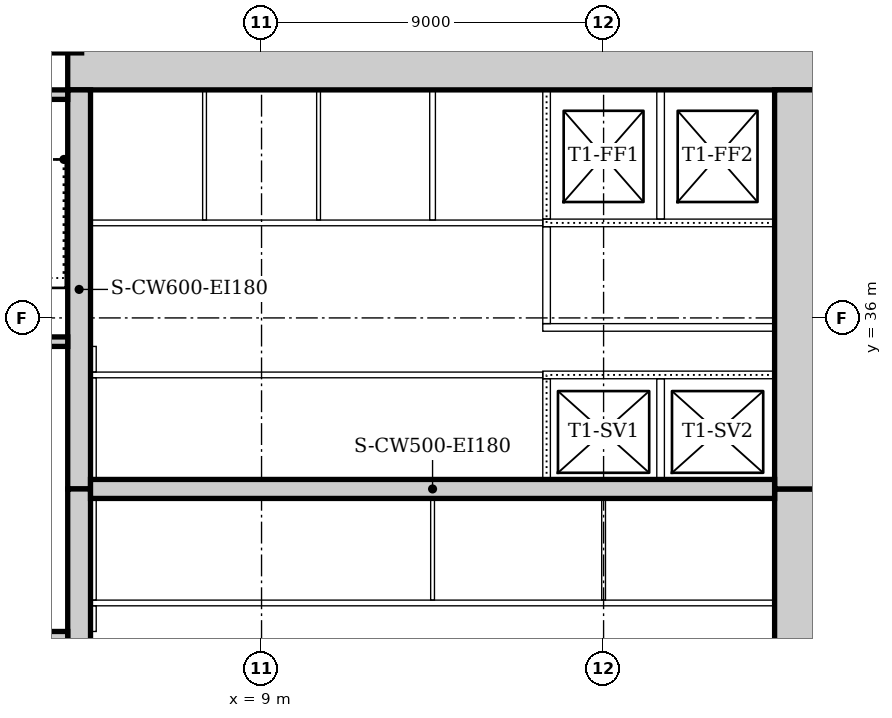
"""IFC4 building model, lengths in metres.
Left out: names, types, materials, properties, quantities, classifications, styles, units other than length and angle.
Written with IfcOpenShell. Run it as: python <this file> out.ifc"""

import sys

from ifc_helpers import new_model, si_unit, direction, frame, frame_2d, origin, origin_2d, place, context, subcontext, project, spatial, rectangle, extrude, element, fill, save


model = new_model("IFC4")
c1 = context("Model", 3, precision=1e-05, world=origin(), true_north=direction((0.0, 1.0)))
c2 = subcontext(c1, "Body", "Model", "MODEL_VIEW")
j1 = project(units=[si_unit("LENGTHUNIT", "METRE"), si_unit("PLANEANGLEUNIT", "RADIAN")], contexts=[c1])
p1 = place(None, origin())
s1 = spatial("IfcSite", under=j1, at=p1, CompositionType="ELEMENT")
p2 = place(p1, origin())
s2 = spatial("IfcBuilding", under=s1, at=p2, CompositionType="ELEMENT")
p3 = place(p2, frame((0.0, 0.0, -9.5)))
s3 = spatial("IfcBuildingStorey", under=s2, at=p3, CompositionType="ELEMENT", Elevation=-9.5)
p4 = place(p3, frame((23.7, 42.6, 0.0), z_axis=(0.0, 0.0, 1.0), x_axis=(-1.0, 0.0, 0.0)))
e1 = element("IfcWall", 1, at=p4, inside=s3, PredefinedType="SOLIDWALL", context=c2, shape_type="SweptSolid", body=[
    extrude(rectangle(XDim=19.8, YDim=1.2, at=frame_2d((9.9, 0.0))), origin(), (0.0, 0.0, 1.0), 4.5),
])
p5 = place(p3, frame((23.1, 21.0, 0.0), z_axis=(0.0, 0.0, 1.0), x_axis=(0.0, 1.0, 0.0)))
e2 = element("IfcWall", 2, at=p5, inside=s3, PredefinedType="SOLIDWALL", context=c2, shape_type="SweptSolid", body=[
    extrude(rectangle(XDim=10.5, YDim=1.2, at=frame_2d((5.25, 0.0))), origin(), (0.0, 0.0, 1.0), 4.5),
])
p6 = place(p5, frame((4.35, 0.0, 0.0)))
e3 = element("IfcOpeningElement", 3, at=p6, cuts=e2, PredefinedType="OPENING", context=c2, shape_type="SweptSolid", body=[
    extrude(rectangle(XDim=1.8, YDim=2.1, at=frame_2d((0.9, 1.05))), frame((0.0, 0.61, 0.0), z_axis=(0.0, -1.0, 0.0), x_axis=(1.0, 0.0, 0.0)), (0.0, 0.0, 1.0), 1.22),
])
p7 = place(p3, frame((23.1, 31.5, 0.0), z_axis=(0.0, 0.0, 1.0), x_axis=(0.0, 1.0, 0.0)))
e4 = element("IfcWall", 4, at=p7, inside=s3, PredefinedType="SOLIDWALL", context=c2, shape_type="SweptSolid", body=[
    extrude(rectangle(XDim=10.5, YDim=1.2, at=frame_2d((5.25, 0.0))), origin(), (0.0, 0.0, 1.0), 4.5),
])
p8 = place(p7, frame((3.15, 0.0, 0.0)))
e5 = element("IfcOpeningElement", 5, at=p8, cuts=e4, PredefinedType="OPENING", context=c2, shape_type="SweptSolid", body=[
    extrude(rectangle(XDim=1.0, YDim=2.1, at=frame_2d((0.5, 1.05))), frame((0.0, 0.61, 0.0), z_axis=(0.0, -1.0, 0.0), x_axis=(1.0, 0.0, 0.0)), (0.0, 0.0, 1.0), 1.22),
])
p9 = place(p7, frame((5.2, 0.0, 0.0)))
e6 = element("IfcOpeningElement", 6, at=p9, cuts=e4, PredefinedType="OPENING", context=c2, shape_type="SweptSolid", body=[
    extrude(rectangle(XDim=1.0, YDim=2.1, at=frame_2d((0.5, 1.05))), frame((0.0, 0.61, 0.0), z_axis=(0.0, -1.0, 0.0), x_axis=(1.0, 0.0, 0.0)), (0.0, 0.0, 1.0), 1.22),
])
p10 = place(p3, frame((4.2, 42.0, 0.0), z_axis=(0.0, 0.0, 1.0), x_axis=(0.0, -1.0, 0.0)))
e7 = element("IfcWall", 7, at=p10, inside=s3, PredefinedType="SOLIDWALL", context=c2, shape_type="SweptSolid", body=[
    extrude(rectangle(XDim=10.5, YDim=0.6, at=frame_2d((5.25, 0.0))), origin(), (0.0, 0.0, 1.0), 4.5),
])
p11 = place(p10, frame((5.3, 0.0, 0.0)))
e8 = element("IfcOpeningElement", 8, at=p11, cuts=e7, PredefinedType="OPENING", context=c2, shape_type="SweptSolid", body=[
    extrude(rectangle(XDim=1.0, YDim=2.1, at=frame_2d((0.5, 1.05))), frame((0.0, 0.31, 0.0), z_axis=(0.0, -1.0, 0.0), x_axis=(1.0, 0.0, 0.0)), (0.0, 0.0, 1.0), 0.62),
])
p12 = place(p3, frame((4.2, 31.5, 0.0), z_axis=(0.0, 0.0, 1.0), x_axis=(0.0, -1.0, 0.0)))
e9 = element("IfcWall", 9, at=p12, inside=s3, PredefinedType="SOLIDWALL", context=c2, shape_type="SweptSolid", body=[
    extrude(rectangle(XDim=10.5, YDim=0.6, at=frame_2d((5.25, 0.0))), origin(), (0.0, 0.0, 1.0), 4.5),
])
p13 = place(p12, frame((4.25, 0.0, 0.0)))
e10 = element("IfcOpeningElement", 10, at=p13, cuts=e9, PredefinedType="OPENING", context=c2, shape_type="SweptSolid", body=[
    extrude(rectangle(XDim=1.0, YDim=2.1, at=frame_2d((0.5, 1.05))), frame((0.0, 0.31, 0.0), z_axis=(0.0, -1.0, 0.0), x_axis=(1.0, 0.0, 0.0)), (0.0, 0.0, 1.0), 0.62),
])
p14 = place(p3, frame((4.5, 31.5, 0.0), z_axis=(0.0, 0.0, 1.0), x_axis=(1.0, 0.0, 0.0)))
e11 = element("IfcWall", 11, at=p14, inside=s3, PredefinedType="SOLIDWALL", context=c2, shape_type="SweptSolid", body=[
    extrude(rectangle(XDim=18.0, YDim=0.5, at=frame_2d((9.0, 0.0))), origin(), (0.0, 0.0, 1.0), 4.5),
])
p15 = place(p3, frame((3.9, 27.625, 0.0), z_axis=(0.0, 0.0, 1.0), x_axis=(-1.0, 0.0, 0.0)))
e12 = element("IfcWall", 12, at=p15, inside=s3, PredefinedType="SOLIDWALL", context=c2, shape_type="SweptSolid", body=[
    extrude(rectangle(XDim=3.54, YDim=0.25, at=frame_2d((1.77, 0.0))), origin(), (0.0, 0.0, 1.0), 4.5),
])
p16 = place(p15, frame((0.4, 0.0, 0.0)))
e13 = element("IfcOpeningElement", 13, at=p16, cuts=e12, PredefinedType="OPENING", context=c2, shape_type="SweptSolid", body=[
    extrude(rectangle(XDim=1.0, YDim=2.1, at=frame_2d((0.5, 1.05))), frame((0.0, 0.135, 0.0), z_axis=(0.0, -1.0, 0.0), x_axis=(1.0, 0.0, 0.0)), (0.0, 0.0, 1.0), 0.27),
])
p17 = place(p3, frame((0.36, 35.375, 0.0), z_axis=(0.0, 0.0, 1.0), x_axis=(1.0, 0.0, 0.0)))
e14 = element("IfcWall", 14, at=p17, inside=s3, PredefinedType="SOLIDWALL", context=c2, shape_type="SweptSolid", body=[
    extrude(rectangle(XDim=3.54, YDim=0.25, at=frame_2d((1.77, 0.0))), origin(), (0.0, 0.0, 1.0), 4.5),
])
p18 = place(p17, frame((2.14, 0.0, 0.0)))
e15 = element("IfcOpeningElement", 15, at=p18, cuts=e14, PredefinedType="OPENING", context=c2, shape_type="SweptSolid", body=[
    extrude(rectangle(XDim=1.0, YDim=2.1, at=frame_2d((0.5, 1.05))), frame((0.0, 0.135, 0.0), z_axis=(0.0, -1.0, 0.0), x_axis=(1.0, 0.0, 0.0)), (0.0, 0.0, 1.0), 0.27),
])
p19 = place(p3, frame((3.9, 41.875, 0.0), z_axis=(0.0, 0.0, 1.0), x_axis=(-1.0, 0.0, 0.0)))
e16 = element("IfcWall", 16, at=p19, inside=s3, PredefinedType="SOLIDWALL", context=c2, shape_type="SweptSolid", body=[
    extrude(rectangle(XDim=3.54, YDim=0.25, at=frame_2d((1.77, 0.0))), origin(), (0.0, 0.0, 1.0), 4.5),
])
p20 = place(p3, frame((3.667, 43.574, 0.0), z_axis=(0.0, 0.0, 1.0), x_axis=(1.0, 0.0, 0.0)))
e17 = element("IfcColumn", 17, at=p20, inside=s3, PredefinedType="COLUMN", context=c2, shape_type="SweptSolid", body=[
    extrude(rectangle(XDim=1.2, YDim=1.2, at=origin_2d()), origin(), (0.0, 0.0, 1.0), 4.15),
])
p21 = place(p3, frame((16.4, 35.75, 0.0), z_axis=(0.0, 0.0, 1.0), x_axis=(1.0, 0.0, 0.0)))
e18 = element("IfcWall", 18, at=p21, inside=s3, PredefinedType="PARTITIONING", context=c2, shape_type="SweptSolid", body=[
    extrude(rectangle(XDim=6.1, YDim=0.2, at=frame_2d((3.05, 0.0))), origin(), (0.0, 0.0, 1.0), 4.15),
])
p22 = place(p3, frame((16.4, 38.5, 0.0), z_axis=(0.0, 0.0, 1.0), x_axis=(1.0, 0.0, 0.0)))
e19 = element("IfcWall", 19, at=p22, inside=s3, PredefinedType="PARTITIONING", context=c2, shape_type="SweptSolid", body=[
    extrude(rectangle(XDim=6.1, YDim=0.2, at=frame_2d((3.05, 0.0))), origin(), (0.0, 0.0, 1.0), 4.15),
])
p23 = place(p22, frame((1.0, 0.0, 0.0)))
e20 = element("IfcOpeningElement", 20, at=p23, cuts=e19, PredefinedType="OPENING", context=c2, shape_type="SweptSolid", body=[
    extrude(rectangle(XDim=1.2, YDim=2.1, at=frame_2d((0.6, 1.05))), frame((0.0, 0.11, 0.0), z_axis=(0.0, -1.0, 0.0), x_axis=(1.0, 0.0, 0.0)), (0.0, 0.0, 1.0), 0.22),
])
p24 = place(p22, frame((4.0, 0.0, 0.0)))
e21 = element("IfcOpeningElement", 21, at=p24, cuts=e19, PredefinedType="OPENING", context=c2, shape_type="SweptSolid", body=[
    extrude(rectangle(XDim=1.2, YDim=2.1, at=frame_2d((0.6, 1.05))), frame((0.0, 0.11, 0.0), z_axis=(0.0, -1.0, 0.0), x_axis=(1.0, 0.0, 0.0)), (0.0, 0.0, 1.0), 0.22),
])
p25 = place(p3, frame((16.5, 35.85, 0.0), z_axis=(0.0, 0.0, 1.0), x_axis=(0.0, 1.0, 0.0)))
e22 = element("IfcWall", 22, at=p25, inside=s3, PredefinedType="PARTITIONING", context=c2, shape_type="SweptSolid", body=[
    extrude(rectangle(XDim=2.55, YDim=0.2, at=frame_2d((1.275, 0.0))), origin(), (0.0, 0.0, 1.0), 4.15),
])
p26 = place(p3, frame((16.4, 34.5, 0.0), z_axis=(0.0, 0.0, 1.0), x_axis=(1.0, 0.0, 0.0)))
e23 = element("IfcWall", 23, at=p26, inside=s3, PredefinedType="PARTITIONING", context=c2, shape_type="SweptSolid", body=[
    extrude(rectangle(XDim=6.1, YDim=0.2, at=frame_2d((3.05, 0.0))), origin(), (0.0, 0.0, 1.0), 4.15),
])
p27 = place(p26, frame((1.05, 0.0, 0.0)))
e24 = element("IfcOpeningElement", 24, at=p27, cuts=e23, PredefinedType="OPENING", context=c2, shape_type="SweptSolid", body=[
    extrude(rectangle(XDim=1.1, YDim=2.1, at=frame_2d((0.55, 1.05))), frame((0.0, 0.11, 0.0), z_axis=(0.0, -1.0, 0.0), x_axis=(1.0, 0.0, 0.0)), (0.0, 0.0, 1.0), 0.22),
])
p28 = place(p26, frame((4.05, 0.0, 0.0)))
e25 = element("IfcOpeningElement", 25, at=p28, cuts=e23, PredefinedType="OPENING", context=c2, shape_type="SweptSolid", body=[
    extrude(rectangle(XDim=1.1, YDim=2.1, at=frame_2d((0.55, 1.05))), frame((0.0, 0.11, 0.0), z_axis=(0.0, -1.0, 0.0), x_axis=(1.0, 0.0, 0.0)), (0.0, 0.0, 1.0), 0.22),
])
for number, where, z_axis, x_axis in (
    (26, (16.5, 38.6, 0.0), (0.0, 0.0, 1.0), (0.0, 1.0, 0.0)),
    (27, (19.5, 38.6, 0.0), (0.0, 0.0, 1.0), (0.0, 1.0, 0.0)),
):
    element("IfcWall", number, at=place(p3, frame(where, z_axis=z_axis, x_axis=x_axis)), inside=s3, PredefinedType="PARTITIONING", context=c2, shape_type="SweptSolid", body=[
        extrude(rectangle(XDim=3.4, YDim=0.2, at=frame_2d((1.7, 0.0))), origin(), (0.0, 0.0, 1.0), 4.15),
    ])
for number, where, z_axis, x_axis in (
    (28, (16.5, 31.75, 0.0), (0.0, 0.0, 1.0), (0.0, 1.0, 0.0)),
    (29, (19.5, 31.75, 0.0), (0.0, 0.0, 1.0), (0.0, 1.0, 0.0)),
):
    element("IfcWall", number, at=place(p3, frame(where, z_axis=z_axis, x_axis=x_axis)), inside=s3, PredefinedType="PARTITIONING", context=c2, shape_type="SweptSolid", body=[
        extrude(rectangle(XDim=2.65, YDim=0.2, at=frame_2d((1.325, 0.0))), origin(), (0.0, 0.0, 1.0), 4.15),
    ])
p29 = place(p3, frame((4.5, 28.5, 0.0), z_axis=(0.0, 0.0, 1.0), x_axis=(1.0, 0.0, 0.0)))
e30 = element("IfcWall", 30, at=p29, inside=s3, PredefinedType="PARTITIONING", context=c2, shape_type="SweptSolid", body=[
    extrude(rectangle(XDim=18.0, YDim=0.15, at=frame_2d((9.0, 0.0))), origin(), (0.0, 0.0, 1.0), 4.15),
])
p30 = place(p29, frame((4.1, 0.0, 0.0)))
e31 = element("IfcOpeningElement", 31, at=p30, cuts=e30, PredefinedType="OPENING", context=c2, shape_type="SweptSolid", body=[
    extrude(rectangle(XDim=0.9, YDim=2.1, at=frame_2d((0.45, 1.05))), frame((0.0, 0.085, 0.0), z_axis=(0.0, -1.0, 0.0), x_axis=(1.0, 0.0, 0.0)), (0.0, 0.0, 1.0), 0.17),
])
p31 = place(p29, frame((10.8, 0.0, 0.0)))
e32 = element("IfcOpeningElement", 32, at=p31, cuts=e30, PredefinedType="OPENING", context=c2, shape_type="SweptSolid", body=[
    extrude(rectangle(XDim=0.9, YDim=2.1, at=frame_2d((0.45, 1.05))), frame((0.0, 0.085, 0.0), z_axis=(0.0, -1.0, 0.0), x_axis=(1.0, 0.0, 0.0)), (0.0, 0.0, 1.0), 0.17),
])
p32 = place(p29, frame((15.2, 0.0, 0.0)))
e33 = element("IfcOpeningElement", 33, at=p32, cuts=e30, PredefinedType="OPENING", context=c2, shape_type="SweptSolid", body=[
    extrude(rectangle(XDim=0.9, YDim=2.1, at=frame_2d((0.45, 1.05))), frame((0.0, 0.085, 0.0), z_axis=(0.0, -1.0, 0.0), x_axis=(1.0, 0.0, 0.0)), (0.0, 0.0, 1.0), 0.17),
])
p33 = place(p3, frame((4.5, 34.5, 0.0), z_axis=(0.0, 0.0, 1.0), x_axis=(1.0, 0.0, 0.0)))
e34 = element("IfcWall", 34, at=p33, inside=s3, PredefinedType="PARTITIONING", context=c2, shape_type="SweptSolid", body=[
    extrude(rectangle(XDim=11.9, YDim=0.15, at=frame_2d((5.95, 0.0))), origin(), (0.0, 0.0, 1.0), 4.15),
])
p34 = place(p33, frame((5.5, 0.0, 0.0)))
e35 = element("IfcOpeningElement", 35, at=p34, cuts=e34, PredefinedType="OPENING", context=c2, shape_type="SweptSolid", body=[
    extrude(rectangle(XDim=0.9, YDim=2.1, at=frame_2d((0.45, 1.05))), frame((0.0, 0.085, 0.0), z_axis=(0.0, -1.0, 0.0), x_axis=(1.0, 0.0, 0.0)), (0.0, 0.0, 1.0), 0.17),
])
p35 = place(p3, frame((4.5, 38.5, 0.0), z_axis=(0.0, 0.0, 1.0), x_axis=(1.0, 0.0, 0.0)))
e36 = element("IfcWall", 36, at=p35, inside=s3, PredefinedType="PARTITIONING", context=c2, shape_type="SweptSolid", body=[
    extrude(rectangle(XDim=11.9, YDim=0.15, at=frame_2d((5.95, 0.0))), origin(), (0.0, 0.0, 1.0), 4.15),
])
p36 = place(p35, frame((1.1, 0.0, 0.0)))
e37 = element("IfcOpeningElement", 37, at=p36, cuts=e36, PredefinedType="OPENING", context=c2, shape_type="SweptSolid", body=[
    extrude(rectangle(XDim=0.9, YDim=2.1, at=frame_2d((0.45, 1.05))), frame((0.0, 0.085, 0.0), z_axis=(0.0, -1.0, 0.0), x_axis=(1.0, 0.0, 0.0)), (0.0, 0.0, 1.0), 0.17),
])
p37 = place(p35, frame((4.05, 0.0, 0.0)))
e38 = element("IfcOpeningElement", 38, at=p37, cuts=e36, PredefinedType="OPENING", context=c2, shape_type="SweptSolid", body=[
    extrude(rectangle(XDim=0.9, YDim=2.1, at=frame_2d((0.45, 1.05))), frame((0.0, 0.085, 0.0), z_axis=(0.0, -1.0, 0.0), x_axis=(1.0, 0.0, 0.0)), (0.0, 0.0, 1.0), 0.17),
])
p38 = place(p35, frame((7.05, 0.0, 0.0)))
e39 = element("IfcOpeningElement", 39, at=p38, cuts=e36, PredefinedType="OPENING", context=c2, shape_type="SweptSolid", body=[
    extrude(rectangle(XDim=0.9, YDim=2.1, at=frame_2d((0.45, 1.05))), frame((0.0, 0.085, 0.0), z_axis=(0.0, -1.0, 0.0), x_axis=(1.0, 0.0, 0.0)), (0.0, 0.0, 1.0), 0.17),
])
p39 = place(p35, frame((9.95, 0.0, 0.0)))
e40 = element("IfcOpeningElement", 40, at=p39, cuts=e36, PredefinedType="OPENING", context=c2, shape_type="SweptSolid", body=[
    extrude(rectangle(XDim=0.8, YDim=2.1, at=frame_2d((0.4, 1.05))), frame((0.0, 0.085, 0.0), z_axis=(0.0, -1.0, 0.0), x_axis=(1.0, 0.0, 0.0)), (0.0, 0.0, 1.0), 0.17),
])
p40 = place(p3, frame((4.575, 34.575, 0.0), z_axis=(0.0, 0.0, 1.0), x_axis=(0.0, 1.0, 0.0)))
e41 = element("IfcWall", 41, at=p40, inside=s3, PredefinedType="PARTITIONING", context=c2, shape_type="SweptSolid", body=[
    extrude(rectangle(XDim=0.675, YDim=0.15, at=frame_2d((0.338, 0.0))), origin(), (0.0, 0.0, 1.0), 4.15),
])
p41 = place(p3, frame((4.575, 31.75, 0.0), z_axis=(0.0, 0.0, 1.0), x_axis=(0.0, 1.0, 0.0)))
e42 = element("IfcWall", 42, at=p41, inside=s3, PredefinedType="PARTITIONING", context=c2, shape_type="SweptSolid", body=[
    extrude(rectangle(XDim=2.675, YDim=0.15, at=frame_2d((1.337, 0.0))), origin(), (0.0, 0.0, 1.0), 4.15),
])
p42 = place(p3, frame((4.575, 27.75, 0.0), z_axis=(0.0, 0.0, 1.0), x_axis=(0.0, 1.0, 0.0)))
e43 = element("IfcWall", 43, at=p42, inside=s3, PredefinedType="PARTITIONING", context=c2, shape_type="SweptSolid", body=[
    extrude(rectangle(XDim=0.675, YDim=0.15, at=frame_2d((0.338, 0.0))), origin(), (0.0, 0.0, 1.0), 4.15),
])
p43 = place(p3, frame((4.575, 28.575, 0.0), z_axis=(0.0, 0.0, 1.0), x_axis=(0.0, 1.0, 0.0)))
e44 = element("IfcWall", 44, at=p43, inside=s3, PredefinedType="PARTITIONING", context=c2, shape_type="SweptSolid", body=[
    extrude(rectangle(XDim=2.675, YDim=0.15, at=frame_2d((1.337, 0.0))), origin(), (0.0, 0.0, 1.0), 4.15),
])
p44 = place(p3, frame((13.5, 38.575, 0.0), z_axis=(0.0, 0.0, 1.0), x_axis=(0.0, 1.0, 0.0)))
e45 = element("IfcWall", 45, at=p44, inside=s3, PredefinedType="PARTITIONING", context=c2, shape_type="SweptSolid", body=[
    extrude(rectangle(XDim=3.425, YDim=0.15, at=frame_2d((1.712, 0.0))), origin(), (0.0, 0.0, 1.0), 4.15),
])
for number, where, z_axis, x_axis in (
    (46, (7.5, 38.575, 0.0), (0.0, 0.0, 1.0), (0.0, 1.0, 0.0)),
    (47, (10.5, 38.575, 0.0), (0.0, 0.0, 1.0), (0.0, 1.0, 0.0)),
):
    element("IfcWall", number, at=place(p3, frame(where, z_axis=z_axis, x_axis=x_axis)), inside=s3, PredefinedType="PARTITIONING", context=c2, shape_type="SweptSolid", body=[
        extrude(rectangle(XDim=3.425, YDim=0.1, at=frame_2d((1.712, 0.0))), origin(), (0.0, 0.0, 1.0), 4.15),
    ])
for number, where, z_axis, x_axis in (
    (48, (13.5, 28.575, 0.0), (0.0, 0.0, 1.0), (0.0, 1.0, 0.0)),
    (49, (18.0, 28.575, 0.0), (0.0, 0.0, 1.0), (0.0, 1.0, 0.0)),
):
    element("IfcWall", number, at=place(p3, frame(where, z_axis=z_axis, x_axis=x_axis)), inside=s3, PredefinedType="PARTITIONING", context=c2, shape_type="SweptSolid", body=[
        extrude(rectangle(XDim=2.675, YDim=0.1, at=frame_2d((1.337, 0.0))), origin(), (0.0, 0.0, 1.0), 4.15),
    ])
p45 = place(p11, frame((1.0, 0.0, 0.0), z_axis=(0.0, 0.0, 1.0), x_axis=(-1.0, 0.0, 0.0)))
e50 = element("IfcDoor", 50, at=p45, inside=s3, OperationType="SINGLE_SWING_LEFT", PredefinedType="DOOR", context=c2, shape_type="SweptSolid", body=[
    extrude(rectangle(XDim=1.0, YDim=2.1, at=frame_2d((0.5, 1.05))), frame((0.0, 0.025, 0.0), z_axis=(0.0, -1.0, 0.0), x_axis=(1.0, 0.0, 0.0)), (0.0, 0.0, 1.0), 0.05),
])
fill(e8, e50)
p46 = place(p27, origin())
e51 = element("IfcDoor", 51, at=p46, inside=s3, OperationType="SLIDING_TO_LEFT", PredefinedType="DOOR", context=c2, shape_type="SweptSolid", body=[
    extrude(rectangle(XDim=1.1, YDim=2.1, at=frame_2d((0.55, 1.05))), frame((0.0, 0.025, 0.0), z_axis=(0.0, -1.0, 0.0), x_axis=(1.0, 0.0, 0.0)), (0.0, 0.0, 1.0), 0.05),
])
fill(e24, e51)
p47 = place(p28, origin())
e52 = element("IfcDoor", 52, at=p47, inside=s3, OperationType="SLIDING_TO_LEFT", PredefinedType="DOOR", context=c2, shape_type="SweptSolid", body=[
    extrude(rectangle(XDim=1.1, YDim=2.1, at=frame_2d((0.55, 1.05))), frame((0.0, 0.025, 0.0), z_axis=(0.0, -1.0, 0.0), x_axis=(1.0, 0.0, 0.0)), (0.0, 0.0, 1.0), 0.05),
])
fill(e25, e52)
p48 = place(p23, origin())
e53 = element("IfcDoor", 53, at=p48, inside=s3, OperationType="SLIDING_TO_LEFT", PredefinedType="DOOR", context=c2, shape_type="SweptSolid", body=[
    extrude(rectangle(XDim=1.2, YDim=2.1, at=frame_2d((0.6, 1.05))), frame((0.0, 0.025, 0.0), z_axis=(0.0, -1.0, 0.0), x_axis=(1.0, 0.0, 0.0)), (0.0, 0.0, 1.0), 0.05),
])
fill(e20, e53)
p49 = place(p24, origin())
e54 = element("IfcDoor", 54, at=p49, inside=s3, OperationType="SLIDING_TO_LEFT", PredefinedType="DOOR", context=c2, shape_type="SweptSolid", body=[
    extrude(rectangle(XDim=1.2, YDim=2.1, at=frame_2d((0.6, 1.05))), frame((0.0, 0.025, 0.0), z_axis=(0.0, -1.0, 0.0), x_axis=(1.0, 0.0, 0.0)), (0.0, 0.0, 1.0), 0.05),
])
fill(e21, e54)
p50 = place(p8, frame((1.0, 0.0, 0.0), z_axis=(0.0, 0.0, 1.0), x_axis=(-1.0, 0.0, 0.0)))
e55 = element("IfcDoor", 55, at=p50, inside=s3, OperationType="SINGLE_SWING_LEFT", PredefinedType="DOOR", context=c2, shape_type="SweptSolid", body=[
    extrude(rectangle(XDim=1.0, YDim=2.1, at=frame_2d((0.5, 1.05))), frame((0.0, 0.025, 0.0), z_axis=(0.0, -1.0, 0.0), x_axis=(1.0, 0.0, 0.0)), (0.0, 0.0, 1.0), 0.05),
])
fill(e5, e55)
p51 = place(p9, frame((1.0, 0.0, 0.0), z_axis=(0.0, 0.0, 1.0), x_axis=(-1.0, 0.0, 0.0)))
e56 = element("IfcDoor", 56, at=p51, inside=s3, OperationType="SINGLE_SWING_RIGHT", PredefinedType="DOOR", context=c2, shape_type="SweptSolid", body=[
    extrude(rectangle(XDim=1.0, YDim=2.1, at=frame_2d((0.5, 1.05))), frame((0.0, 0.025, 0.0), z_axis=(0.0, -1.0, 0.0), x_axis=(1.0, 0.0, 0.0)), (0.0, 0.0, 1.0), 0.05),
])
fill(e6, e56)
p52 = place(p30, origin())
e57 = element("IfcDoor", 57, at=p52, inside=s3, OperationType="SINGLE_SWING_RIGHT", PredefinedType="DOOR", context=c2, shape_type="SweptSolid", body=[
    extrude(rectangle(XDim=0.9, YDim=2.1, at=frame_2d((0.45, 1.05))), frame((0.0, 0.025, 0.0), z_axis=(0.0, -1.0, 0.0), x_axis=(1.0, 0.0, 0.0)), (0.0, 0.0, 1.0), 0.05),
])
fill(e31, e57)
p53 = place(p31, origin())
e58 = element("IfcDoor", 58, at=p53, inside=s3, OperationType="SINGLE_SWING_RIGHT", PredefinedType="DOOR", context=c2, shape_type="SweptSolid", body=[
    extrude(rectangle(XDim=0.9, YDim=2.1, at=frame_2d((0.45, 1.05))), frame((0.0, 0.025, 0.0), z_axis=(0.0, -1.0, 0.0), x_axis=(1.0, 0.0, 0.0)), (0.0, 0.0, 1.0), 0.05),
])
fill(e32, e58)
p54 = place(p32, origin())
e59 = element("IfcDoor", 59, at=p54, inside=s3, OperationType="SINGLE_SWING_RIGHT", PredefinedType="DOOR", context=c2, shape_type="SweptSolid", body=[
    extrude(rectangle(XDim=0.9, YDim=2.1, at=frame_2d((0.45, 1.05))), frame((0.0, 0.025, 0.0), z_axis=(0.0, -1.0, 0.0), x_axis=(1.0, 0.0, 0.0)), (0.0, 0.0, 1.0), 0.05),
])
fill(e33, e59)
p55 = place(p34, frame((0.9, 0.0, 0.0), z_axis=(0.0, 0.0, 1.0), x_axis=(-1.0, 0.0, 0.0)))
e60 = element("IfcDoor", 60, at=p55, inside=s3, OperationType="SINGLE_SWING_RIGHT", PredefinedType="DOOR", context=c2, shape_type="SweptSolid", body=[
    extrude(rectangle(XDim=0.9, YDim=2.1, at=frame_2d((0.45, 1.05))), frame((0.0, 0.025, 0.0), z_axis=(0.0, -1.0, 0.0), x_axis=(1.0, 0.0, 0.0)), (0.0, 0.0, 1.0), 0.05),
])
fill(e35, e60)
p56 = place(p36, origin())
e61 = element("IfcDoor", 61, at=p56, inside=s3, OperationType="SINGLE_SWING_RIGHT", PredefinedType="DOOR", context=c2, shape_type="SweptSolid", body=[
    extrude(rectangle(XDim=0.9, YDim=2.1, at=frame_2d((0.45, 1.05))), frame((0.0, 0.025, 0.0), z_axis=(0.0, -1.0, 0.0), x_axis=(1.0, 0.0, 0.0)), (0.0, 0.0, 1.0), 0.05),
])
fill(e37, e61)
p57 = place(p37, origin())
e62 = element("IfcDoor", 62, at=p57, inside=s3, OperationType="SINGLE_SWING_LEFT", PredefinedType="DOOR", context=c2, shape_type="SweptSolid", body=[
    extrude(rectangle(XDim=0.9, YDim=2.1, at=frame_2d((0.45, 1.05))), frame((0.0, 0.025, 0.0), z_axis=(0.0, -1.0, 0.0), x_axis=(1.0, 0.0, 0.0)), (0.0, 0.0, 1.0), 0.05),
])
fill(e38, e62)
p58 = place(p38, origin())
e63 = element("IfcDoor", 63, at=p58, inside=s3, OperationType="SINGLE_SWING_RIGHT", PredefinedType="DOOR", context=c2, shape_type="SweptSolid", body=[
    extrude(rectangle(XDim=0.9, YDim=2.1, at=frame_2d((0.45, 1.05))), frame((0.0, 0.025, 0.0), z_axis=(0.0, -1.0, 0.0), x_axis=(1.0, 0.0, 0.0)), (0.0, 0.0, 1.0), 0.05),
])
fill(e39, e63)
p59 = place(p39, origin())
e64 = element("IfcDoor", 64, at=p59, inside=s3, OperationType="SINGLE_SWING_LEFT", PredefinedType="DOOR", context=c2, shape_type="SweptSolid", body=[
    extrude(rectangle(XDim=0.8, YDim=2.1, at=frame_2d((0.4, 1.05))), frame((0.0, 0.025, 0.0), z_axis=(0.0, -1.0, 0.0), x_axis=(1.0, 0.0, 0.0)), (0.0, 0.0, 1.0), 0.05),
])
fill(e40, e64)
save(model, sys.argv[1])
